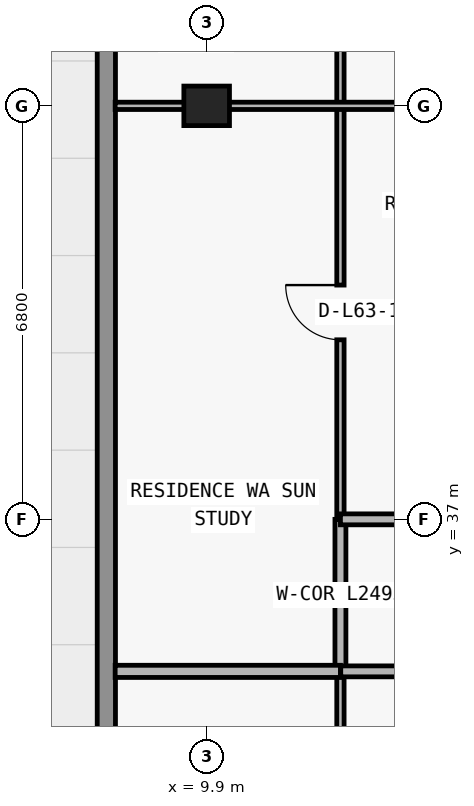
"""IFC4 building model, lengths in metres.
Left out: names, types, materials, properties, quantities, classifications, styles, units other than length and angle.
Written with IfcOpenShell. Run it as: python <this file> out.ifc"""

import sys

from ifc_helpers import new_model, si_unit, direction, frame, frame_2d, origin, origin_2d, place, context, subcontext, project, spatial, rectangle, extrude, element, fill, save


model = new_model("IFC4")
c1 = context("Model", 3, precision=1e-05, world=origin(), true_north=direction((0.0, 1.0)))
c2 = subcontext(c1, "Body", "Model", "MODEL_VIEW")
j1 = project(units=[si_unit("LENGTHUNIT", "METRE"), si_unit("PLANEANGLEUNIT", "RADIAN")], contexts=[c1])
p1 = place(None, origin())
s1 = spatial("IfcSite", under=j1, at=p1, CompositionType="ELEMENT")
p2 = place(p1, origin())
s2 = spatial("IfcBuilding", under=s1, at=p2, CompositionType="ELEMENT")
p3 = place(p2, frame((0.0, 0.0, 226.5)))
s3 = spatial("IfcBuildingStorey", under=s2, at=p3, CompositionType="ELEMENT", Elevation=226.5)
p4 = place(p3, frame((9.9, 43.8, 0.0), z_axis=(0.0, 0.0, 1.0), x_axis=(1.0, 0.0, 0.0)))
e1 = element("IfcColumn", 1, at=p4, inside=s3, PredefinedType="COLUMN", context=c2, shape_type="SweptSolid", body=[
    extrude(rectangle(XDim=0.75, YDim=0.65, at=origin_2d()), origin(), (0.0, 0.0, 1.0), 3.05),
])
p5 = place(p3, frame((8.25, 30.15, 0.0), z_axis=(0.0, 0.0, 1.0), x_axis=(0.0, 1.0, 0.0)))
e2 = element("IfcWall", 2, at=p5, inside=s3, PredefinedType="STANDARD", context=c2, shape_type="SweptSolid", body=[
    extrude(rectangle(XDim=16.85, YDim=0.3, at=frame_2d((8.425, 0.0))), origin(), (0.0, 0.0, 1.0), 3.05),
])
p6 = place(p3, frame((12.1, 28.24, 0.0), z_axis=(0.0, 0.0, 1.0), x_axis=(0.0, 1.0, 0.0)))
e3 = element("IfcWall", 3, at=p6, inside=s3, PredefinedType="PARTITIONING", context=c2, shape_type="SweptSolid", body=[
    extrude(rectangle(XDim=6.26, YDim=0.12, at=frame_2d((3.13, 0.0))), origin(), (0.0, 0.0, 1.0), 3.05),
])
p7 = place(p3, frame((12.1, 34.505, 0.0), z_axis=(0.0, 0.0, 1.0), x_axis=(0.0, 1.0, 0.0)))
e4 = element("IfcWall", 4, at=p7, inside=s3, PredefinedType="PARTITIONING", context=c2, shape_type="SweptSolid", body=[
    extrude(rectangle(XDim=2.495, YDim=0.18, at=frame_2d((1.248, 0.0))), origin(), (0.0, 0.0, 1.0), 3.05),
])
p8 = place(p3, frame((12.1, 37.005, 0.0), z_axis=(0.0, 0.0, 1.0), x_axis=(0.0, 1.0, 0.0)))
e5 = element("IfcWall", 5, at=p8, inside=s3, PredefinedType="PARTITIONING", context=c2, shape_type="SweptSolid", body=[
    extrude(rectangle(XDim=9.875, YDim=0.12, at=frame_2d((4.938, 0.0))), origin(), (0.0, 0.0, 1.0), 3.05),
])
p9 = place(p8, frame((2.948, 0.0, 0.0)))
e6 = element("IfcOpeningElement", 6, at=p9, cuts=e5, PredefinedType="OPENING", context=c2, shape_type="SweptSolid", body=[
    extrude(rectangle(XDim=0.9, YDim=2.15, at=frame_2d((0.45, 1.075))), frame((0.0, 0.07, 0.0), z_axis=(0.0, -1.0, 0.0), x_axis=(1.0, 0.0, 0.0)), (0.0, 0.0, 1.0), 0.14),
])
p10 = place(p8, frame((7.885, 0.0, 0.0)))
e7 = element("IfcOpeningElement", 7, at=p10, cuts=e5, PredefinedType="OPENING", context=c2, shape_type="SweptSolid", body=[
    extrude(rectangle(XDim=0.9, YDim=2.15, at=frame_2d((0.45, 1.075))), frame((0.0, 0.07, 0.0), z_axis=(0.0, -1.0, 0.0), x_axis=(1.0, 0.0, 0.0)), (0.0, 0.0, 1.0), 0.14),
])
p11 = place(p3, frame((8.395, 34.5, 0.0), z_axis=(0.0, 0.0, 1.0), x_axis=(1.0, 0.0, 0.0)))
e8 = element("IfcWall", 8, at=p11, inside=s3, PredefinedType="PARTITIONING", context=c2, shape_type="SweptSolid", body=[
    extrude(rectangle(XDim=3.705, YDim=0.2, at=frame_2d((1.853, 0.0))), origin(), (0.0, 0.0, 1.0), 3.05),
])
p12 = place(p3, frame((12.105, 34.5, 0.0), z_axis=(0.0, 0.0, 1.0), x_axis=(1.0, 0.0, 0.0)))
e9 = element("IfcWall", 9, at=p12, inside=s3, PredefinedType="PARTITIONING", context=c2, shape_type="SweptSolid", body=[
    extrude(rectangle(XDim=27.099, YDim=0.18, at=frame_2d((13.55, 0.0))), origin(), (0.0, 0.0, 1.0), 3.05),
])
p13 = place(p12, frame((1.772, 0.0, 0.0)))
e10 = element("IfcOpeningElement", 10, at=p13, cuts=e9, PredefinedType="OPENING", context=c2, shape_type="SweptSolid", body=[
    extrude(rectangle(XDim=1.0, YDim=2.2, at=frame_2d((0.5, 1.1))), frame((0.0, 0.1, 0.0), z_axis=(0.0, -1.0, 0.0), x_axis=(1.0, 0.0, 0.0)), (0.0, 0.0, 1.0), 0.2),
])
p14 = place(p12, frame((9.07, 0.0, 0.0)))
e11 = element("IfcOpeningElement", 11, at=p14, cuts=e9, PredefinedType="OPENING", context=c2, shape_type="SweptSolid", body=[
    extrude(rectangle(XDim=1.0, YDim=2.2, at=frame_2d((0.5, 1.1))), frame((0.0, 0.1, 0.0), z_axis=(0.0, -1.0, 0.0), x_axis=(1.0, 0.0, 0.0)), (0.0, 0.0, 1.0), 0.2),
])
p15 = place(p12, frame((17.47, 0.0, 0.0)))
e12 = element("IfcOpeningElement", 12, at=p15, cuts=e9, PredefinedType="OPENING", context=c2, shape_type="SweptSolid", body=[
    extrude(rectangle(XDim=1.0, YDim=2.2, at=frame_2d((0.5, 1.1))), frame((0.0, 0.1, 0.0), z_axis=(0.0, -1.0, 0.0), x_axis=(1.0, 0.0, 0.0)), (0.0, 0.0, 1.0), 0.2),
])
p16 = place(p12, frame((24.547, 0.0, 0.0)))
e13 = element("IfcOpeningElement", 13, at=p16, cuts=e9, PredefinedType="OPENING", context=c2, shape_type="SweptSolid", body=[
    extrude(rectangle(XDim=1.0, YDim=2.2, at=frame_2d((0.5, 1.1))), frame((0.0, 0.1, 0.0), z_axis=(0.0, -1.0, 0.0), x_axis=(1.0, 0.0, 0.0)), (0.0, 0.0, 1.0), 0.2),
])
p17 = place(p3, frame((12.1, 37.0, 0.0), z_axis=(0.0, 0.0, 1.0), x_axis=(1.0, 0.0, 0.0)))
e14 = element("IfcWall", 14, at=p17, inside=s3, PredefinedType="PARTITIONING", context=c2, shape_type="SweptSolid", body=[
    extrude(rectangle(XDim=5.845, YDim=0.18, at=frame_2d((2.922, 0.0))), origin(), (0.0, 0.0, 1.0), 3.05),
])
p18 = place(p17, frame((1.275, 0.0, 0.0)))
e15 = element("IfcOpeningElement", 15, at=p18, cuts=e14, PredefinedType="OPENING", context=c2, shape_type="SweptSolid", body=[
    extrude(rectangle(XDim=1.0, YDim=2.2, at=frame_2d((0.5, 1.1))), frame((0.0, 0.1, 0.0), z_axis=(0.0, -1.0, 0.0), x_axis=(1.0, 0.0, 0.0)), (0.0, 0.0, 1.0), 0.2),
])
p19 = place(p3, frame((8.395, 43.8, 0.0), z_axis=(0.0, 0.0, 1.0), x_axis=(1.0, 0.0, 0.0)))
e16 = element("IfcWall", 16, at=p19, inside=s3, PredefinedType="PARTITIONING", context=c2, shape_type="SweptSolid", body=[
    extrude(rectangle(XDim=9.56, YDim=0.12, at=frame_2d((4.78, 0.0))), origin(), (0.0, 0.0, 1.0), 2.418),
])
p20 = place(p19, frame((5.03, 0.0, 0.0)))
e17 = element("IfcOpeningElement", 17, at=p20, cuts=e16, PredefinedType="OPENING", context=c2, shape_type="SweptSolid", body=[
    extrude(rectangle(XDim=0.9, YDim=2.15, at=frame_2d((0.45, 1.075))), frame((0.0, 0.07, 0.0), z_axis=(0.0, -1.0, 0.0), x_axis=(1.0, 0.0, 0.0)), (0.0, 0.0, 1.0), 0.14),
])
p21 = place(p19, frame((7.982, 0.0, 0.0)))
e18 = element("IfcOpeningElement", 18, at=p21, cuts=e16, PredefinedType="OPENING", context=c2, shape_type="SweptSolid", body=[
    extrude(rectangle(XDim=0.85, YDim=2.1, at=frame_2d((0.425, 1.05))), frame((0.0, 0.07, 0.0), z_axis=(0.0, -1.0, 0.0), x_axis=(1.0, 0.0, 0.0)), (0.0, 0.0, 1.0), 0.14),
])
p22 = place(p9, origin())
e19 = element("IfcDoor", 19, at=p22, inside=s3, OperationType="SINGLE_SWING_RIGHT", PredefinedType="DOOR", context=c2, shape_type="SweptSolid", body=[
    extrude(rectangle(XDim=0.9, YDim=2.15, at=frame_2d((0.45, 1.075))), frame((0.0, 0.025, 0.0), z_axis=(0.0, -1.0, 0.0), x_axis=(1.0, 0.0, 0.0)), (0.0, 0.0, 1.0), 0.05),
])
fill(e6, e19)
save(model, sys.argv[1])
